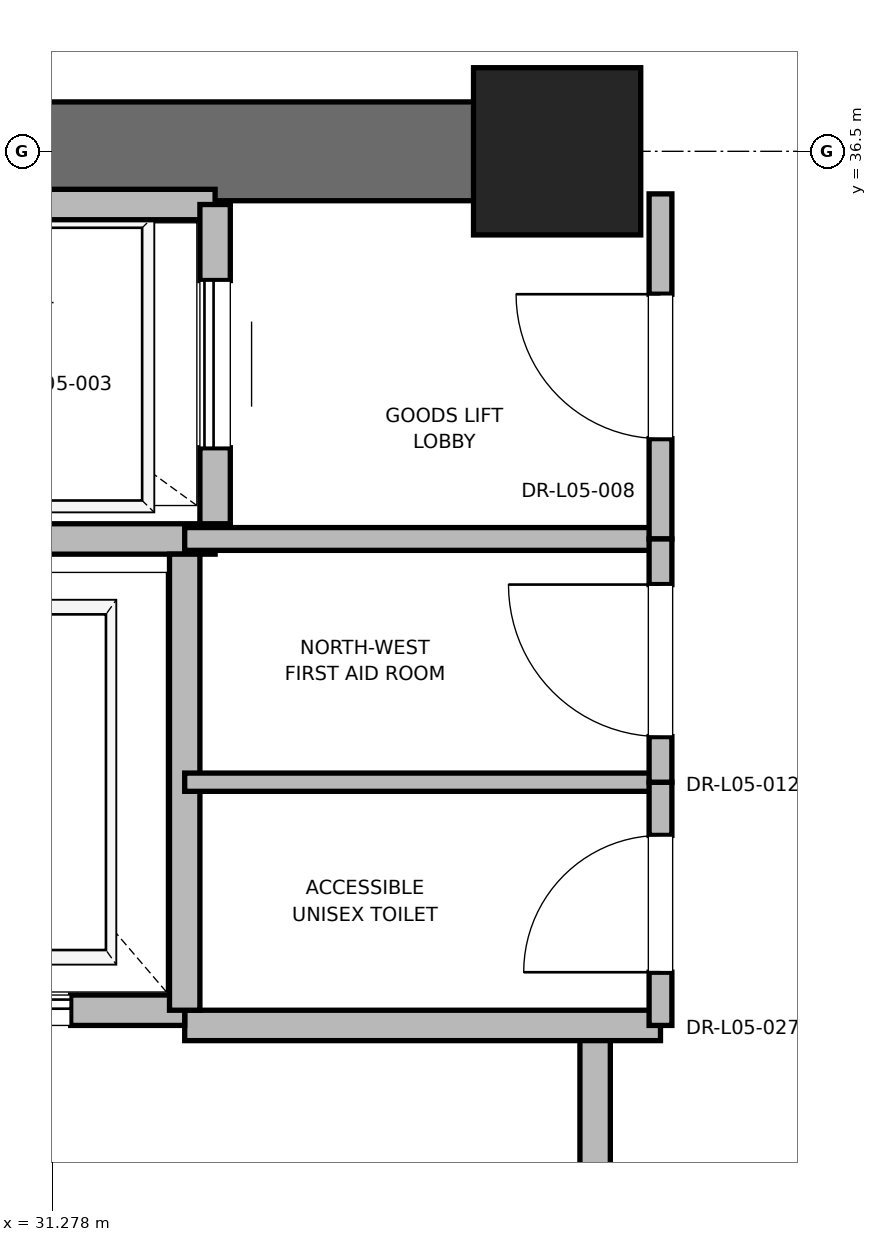
"""IFC4 building model, lengths in metres.
Left out: names, types, materials, properties, quantities, classifications, styles, units other than length and angle.
Written with IfcOpenShell. Run it as: python <this file> out.ifc"""

import sys

from ifc_helpers import new_model, si_unit, direction, frame, frame_2d, origin, origin_2d, place, context, subcontext, project, spatial, rectangle, extrude, element, fill, save


model = new_model("IFC4")
c1 = context("Model", 3, precision=1e-05, world=origin(), true_north=direction((0.0, 1.0)))
c2 = subcontext(c1, "Body", "Model", "MODEL_VIEW")
j1 = project(units=[si_unit("LENGTHUNIT", "METRE"), si_unit("PLANEANGLEUNIT", "RADIAN")], contexts=[c1])
p1 = place(None, origin())
s1 = spatial("IfcSite", under=j1, at=p1, CompositionType="ELEMENT")
p2 = place(p1, origin())
s2 = spatial("IfcBuilding", under=s1, at=p2, CompositionType="ELEMENT")
p3 = place(p2, frame((0.0, 0.0, 27.6)))
s3 = spatial("IfcBuildingStorey", under=s2, at=p3, CompositionType="ELEMENT", Elevation=27.6)
p4 = place(p3, frame((34.6, 36.5, 0.0), z_axis=(0.0, 0.0, 1.0), x_axis=(1.0, 0.0, 0.0)))
e1 = element("IfcColumn", 1, at=p4, inside=s3, PredefinedType="PILASTER", context=c2, shape_type="SweptSolid", body=[
    extrude(rectangle(XDim=1.1, YDim=1.1, at=origin_2d()), origin(), (0.0, 0.0, 1.0), 4.0),
])
p5 = place(p3, frame((29.0, 36.5, 0.0), z_axis=(0.0, 0.0, 1.0), x_axis=(1.0, 0.0, 0.0)))
e2 = element("IfcWall", 2, at=p5, inside=s3, PredefinedType="SHEAR", context=c2, shape_type="SweptSolid", body=[
    extrude(rectangle(XDim=5.8, YDim=0.65, at=frame_2d((2.9, 0.0))), origin(), (0.0, 0.0, 1.0), 3.76),
])
p6 = place(p3, frame((34.85, 27.38, 0.0), z_axis=(0.0, 0.0, 1.0), x_axis=(0.0, 1.0, 0.0)))
e3 = element("IfcWall", 3, at=p6, inside=s3, PredefinedType="PARTITIONING", context=c2, shape_type="SweptSolid", body=[
    extrude(rectangle(XDim=3.37, YDim=0.2, at=frame_2d((1.685, 0.0))), origin(), (0.0, 0.0, 1.0), 3.76),
])
p7 = place(p6, frame((1.11, 0.0, 0.0)))
e4 = element("IfcOpeningElement", 4, at=p7, cuts=e3, PredefinedType="OPENING", context=c2, shape_type="SweptSolid", body=[
    extrude(rectangle(XDim=1.15, YDim=2.2, at=frame_2d((0.575, 1.1))), frame((0.0, 0.1, 0.0), z_axis=(0.0, -1.0, 0.0), x_axis=(1.0, 0.0, 0.0)), (0.0, 0.0, 1.0), 0.2),
])
p8 = place(p3, frame((32.15, 30.75, 0.0), z_axis=(0.0, 0.0, 1.0), x_axis=(1.0, 0.0, 0.0)))
e5 = element("IfcWall", 5, at=p8, inside=s3, PredefinedType="PARTITIONING", context=c2, shape_type="SweptSolid", body=[
    extrude(rectangle(XDim=3.13, YDim=0.2, at=frame_2d((1.565, 0.0))), origin(), (0.0, 0.0, 1.0), 3.76),
])
p9 = place(p3, frame((29.55, 30.85, 0.0), z_axis=(0.0, 0.0, 1.0), x_axis=(1.0, 0.0, 0.0)))
e6 = element("IfcWall", 6, at=p9, inside=s3, PredefinedType="SOLIDWALL", context=c2, shape_type="SweptSolid", body=[
    extrude(rectangle(XDim=2.6, YDim=0.2, at=frame_2d((1.3, 0.0))), origin(), (0.0, 0.0, 1.0), 2.54),
])
p10 = place(p9, frame((0.75, 0.0, 0.0)))
e7 = element("IfcOpeningElement", 7, at=p10, cuts=e6, PredefinedType="OPENING", context=c2, shape_type="SweptSolid", body=[
    extrude(rectangle(XDim=1.1, YDim=2.2, at=frame_2d((0.55, 1.1))), frame((0.0, 0.1, 0.0), z_axis=(0.0, -1.0, 0.0), x_axis=(1.0, 0.0, 0.0)), (0.0, 0.0, 1.0), 0.2),
])
p11 = place(p3, frame((29.55, 33.95, 0.0), z_axis=(0.0, 0.0, 1.0), x_axis=(1.0, 0.0, 0.0)))
e8 = element("IfcWall", 8, at=p11, inside=s3, PredefinedType="SOLIDWALL", context=c2, shape_type="SweptSolid", body=[
    extrude(rectangle(XDim=2.8, YDim=0.2, at=frame_2d((1.4, 0.0))), origin(), (0.0, 0.0, 1.0), 3.76),
])
p12 = place(p3, frame((32.15, 30.85, 0.0), z_axis=(0.0, 0.0, 1.0), x_axis=(0.0, 1.0, 0.0)))
e9 = element("IfcWall", 9, at=p12, inside=s3, PredefinedType="SOLIDWALL", context=c2, shape_type="SweptSolid", body=[
    extrude(rectangle(XDim=3.0, YDim=0.2, at=frame_2d((1.5, 0.0))), origin(), (0.0, 0.0, 1.0), 3.76),
])
p13 = place(p3, frame((32.35, 36.15, 0.0), z_axis=(0.0, 0.0, 1.0), x_axis=(-1.0, 0.0, 0.0)))
e10 = element("IfcWall", 10, at=p13, inside=s3, PredefinedType="SOLIDWALL", context=c2, shape_type="SweptSolid", body=[
    extrude(rectangle(XDim=2.8, YDim=0.2, at=frame_2d((1.4, 0.0))), origin(), (0.0, 0.0, 1.0), 2.889),
])
p14 = place(p3, frame((32.35, 34.05, 0.0), z_axis=(0.0, 0.0, 1.0), x_axis=(0.0, 1.0, 0.0)))
e11 = element("IfcWall", 11, at=p14, inside=s3, PredefinedType="SOLIDWALL", context=c2, shape_type="SweptSolid", body=[
    extrude(rectangle(XDim=2.1, YDim=0.2, at=frame_2d((1.05, 0.0))), origin(), (0.0, 0.0, 1.0), 3.76),
])
p15 = place(p14, frame((0.5, 0.0, 0.0)))
e12 = element("IfcOpeningElement", 12, at=p15, cuts=e11, PredefinedType="OPENING", context=c2, shape_type="SweptSolid", body=[
    extrude(rectangle(XDim=1.1, YDim=2.2, at=frame_2d((0.55, 1.1))), frame((0.0, 0.1, 0.0), z_axis=(0.0, -1.0, 0.0), x_axis=(1.0, 0.0, 0.0)), (0.0, 0.0, 1.0), 0.2),
])
p16 = place(p3, frame((32.15, 33.95, 0.0), z_axis=(0.0, 0.0, 1.0), x_axis=(1.0, 0.0, 0.0)))
e13 = element("IfcWall", 13, at=p16, inside=s3, PredefinedType="PARTITIONING", context=c2, shape_type="SweptSolid", body=[
    extrude(rectangle(XDim=3.13, YDim=0.15, at=frame_2d((1.565, 0.0))), origin(), (0.0, 0.0, 1.0), 2.85),
])
p17 = place(p3, frame((35.28, 33.95, 0.0), z_axis=(0.0, 0.0, 1.0), x_axis=(0.0, 1.0, 0.0)))
e14 = element("IfcWall", 14, at=p17, inside=s3, PredefinedType="PARTITIONING", context=c2, shape_type="SweptSolid", body=[
    extrude(rectangle(XDim=2.27, YDim=0.15, at=frame_2d((1.135, 0.0))), origin(), (0.0, 0.0, 1.0), 2.54),
])
p18 = place(p17, frame((0.66, 0.0, 0.0)))
e15 = element("IfcOpeningElement", 15, at=p18, cuts=e14, PredefinedType="OPENING", context=c2, shape_type="SweptSolid", body=[
    extrude(rectangle(XDim=0.95, YDim=2.15, at=frame_2d((0.475, 1.075))), frame((0.0, 0.075, 0.0), z_axis=(0.0, -1.0, 0.0), x_axis=(1.0, 0.0, 0.0)), (0.0, 0.0, 1.0), 0.15),
])
p19 = place(p3, frame((32.15, 32.35, 0.0), z_axis=(0.0, 0.0, 1.0), x_axis=(1.0, 0.0, 0.0)))
e16 = element("IfcWall", 16, at=p19, inside=s3, PredefinedType="PARTITIONING", context=c2, shape_type="SweptSolid", body=[
    extrude(rectangle(XDim=3.13, YDim=0.12, at=frame_2d((1.565, 0.0))), origin(), (0.0, 0.0, 1.0), 2.85),
])
p20 = place(p3, frame((35.28, 30.75, 0.0), z_axis=(0.0, 0.0, 1.0), x_axis=(0.0, 1.0, 0.0)))
e17 = element("IfcWall", 17, at=p20, inside=s3, PredefinedType="PARTITIONING", context=c2, shape_type="SweptSolid", body=[
    extrude(rectangle(XDim=1.6, YDim=0.15, at=frame_2d((0.8, 0.0))), origin(), (0.0, 0.0, 1.0), 2.85),
])
p21 = place(p20, frame((0.35, 0.0, 0.0)))
e18 = element("IfcOpeningElement", 18, at=p21, cuts=e17, PredefinedType="OPENING", context=c2, shape_type="SweptSolid", body=[
    extrude(rectangle(XDim=0.9, YDim=2.1, at=frame_2d((0.45, 1.05))), frame((0.0, 0.075, 0.0), z_axis=(0.0, -1.0, 0.0), x_axis=(1.0, 0.0, 0.0)), (0.0, 0.0, 1.0), 0.15),
])
p22 = place(p3, frame((35.28, 32.35, 0.0), z_axis=(0.0, 0.0, 1.0), x_axis=(0.0, 1.0, 0.0)))
e19 = element("IfcWall", 19, at=p22, inside=s3, PredefinedType="PARTITIONING", context=c2, shape_type="SweptSolid", body=[
    extrude(rectangle(XDim=1.6, YDim=0.15, at=frame_2d((0.8, 0.0))), origin(), (0.0, 0.0, 1.0), 2.85),
])
p23 = place(p22, frame((0.3, 0.0, 0.0)))
e20 = element("IfcOpeningElement", 20, at=p23, cuts=e19, PredefinedType="OPENING", context=c2, shape_type="SweptSolid", body=[
    extrude(rectangle(XDim=1.0, YDim=2.15, at=frame_2d((0.5, 1.075))), frame((0.0, 0.075, 0.0), z_axis=(0.0, -1.0, 0.0), x_axis=(1.0, 0.0, 0.0)), (0.0, 0.0, 1.0), 0.15),
])
p24 = place(p10, origin())
e21 = element("IfcDoor", 21, at=p24, inside=s3, OperationType="SLIDING_TO_RIGHT", PredefinedType="DOOR", context=c2, shape_type="SweptSolid", body=[
    extrude(rectangle(XDim=1.1, YDim=2.2, at=frame_2d((0.55, 1.1))), frame((0.0, 0.025, 0.0), z_axis=(0.0, -1.0, 0.0), x_axis=(1.0, 0.0, 0.0)), (0.0, 0.0, 1.0), 0.05),
])
fill(e7, e21)
p25 = place(p15, origin())
e22 = element("IfcDoor", 22, at=p25, inside=s3, OperationType="SLIDING_TO_RIGHT", PredefinedType="DOOR", context=c2, shape_type="SweptSolid", body=[
    extrude(rectangle(XDim=1.1, YDim=2.2, at=frame_2d((0.55, 1.1))), frame((0.0, 0.025, 0.0), z_axis=(0.0, -1.0, 0.0), x_axis=(1.0, 0.0, 0.0)), (0.0, 0.0, 1.0), 0.05),
])
fill(e12, e22)
p26 = place(p18, origin())
e23 = element("IfcDoor", 23, at=p26, inside=s3, OperationType="SINGLE_SWING_RIGHT", PredefinedType="DOOR", context=c2, shape_type="SweptSolid", body=[
    extrude(rectangle(XDim=0.95, YDim=2.15, at=frame_2d((0.475, 1.075))), frame((0.0, 0.025, 0.0), z_axis=(0.0, -1.0, 0.0), x_axis=(1.0, 0.0, 0.0)), (0.0, 0.0, 1.0), 0.05),
])
fill(e15, e23)
p27 = place(p21, origin())
e24 = element("IfcDoor", 24, at=p27, inside=s3, OperationType="SINGLE_SWING_LEFT", PredefinedType="DOOR", context=c2, shape_type="SweptSolid", body=[
    extrude(rectangle(XDim=0.9, YDim=2.1, at=frame_2d((0.45, 1.05))), frame((0.0, 0.025, 0.0), z_axis=(0.0, -1.0, 0.0), x_axis=(1.0, 0.0, 0.0)), (0.0, 0.0, 1.0), 0.05),
])
fill(e18, e24)
p28 = place(p23, origin())
e25 = element("IfcDoor", 25, at=p28, inside=s3, OperationType="SINGLE_SWING_RIGHT", PredefinedType="DOOR", context=c2, shape_type="SweptSolid", body=[
    extrude(rectangle(XDim=1.0, YDim=2.15, at=frame_2d((0.5, 1.075))), frame((0.0, 0.025, 0.0), z_axis=(0.0, -1.0, 0.0), x_axis=(1.0, 0.0, 0.0)), (0.0, 0.0, 1.0), 0.05),
])
fill(e20, e25)
save(model, sys.argv[1])
